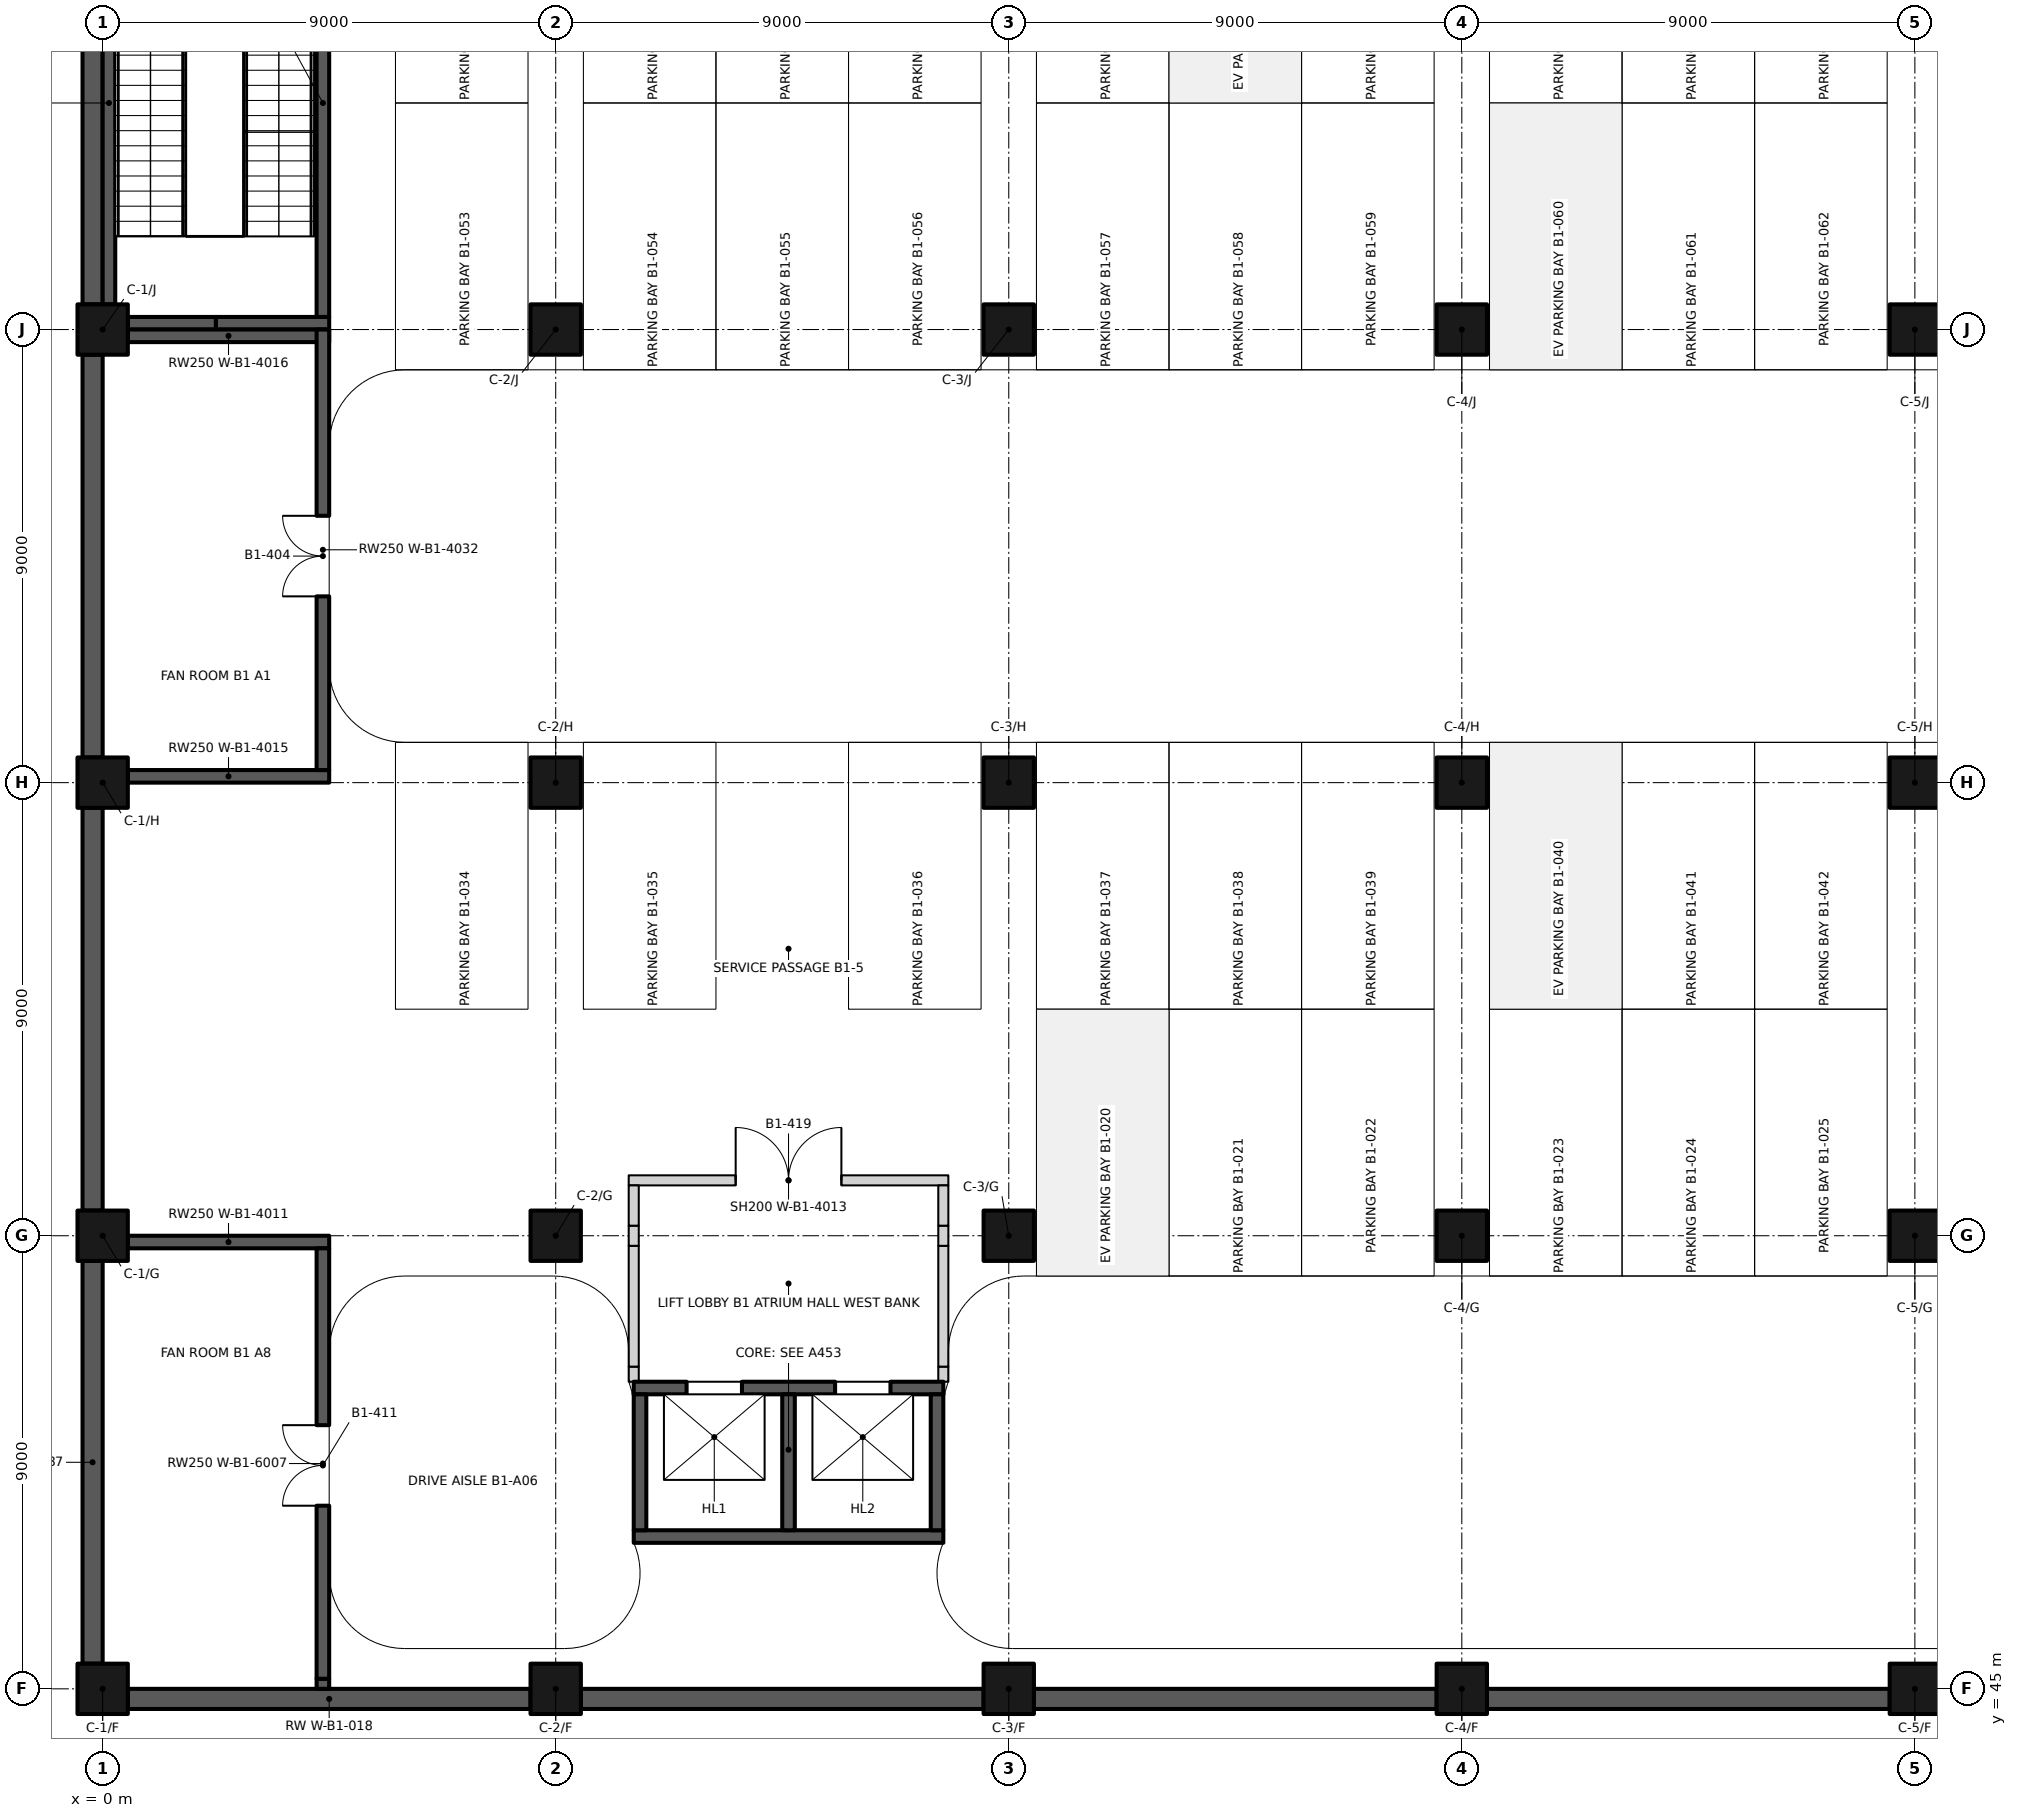
"""IFC4 building model, lengths in metres.
Left out: names, types, materials, properties, quantities, classifications, styles, units other than length and angle.
Written with IfcOpenShell. Run it as: python <this file> out.ifc"""

import sys

from ifc_helpers import new_model, si_unit, direction, frame, frame_2d, origin, origin_2d, place, context, subcontext, project, spatial, rectangle, extrude, element, fill, save


model = new_model("IFC4")
c1 = context("Model", 3, precision=1e-05, world=origin(), true_north=direction((0.0, 1.0)))
c2 = subcontext(c1, "Body", "Model", "MODEL_VIEW")
j1 = project(units=[si_unit("LENGTHUNIT", "METRE"), si_unit("PLANEANGLEUNIT", "RADIAN")], contexts=[c1])
p1 = place(None, origin())
s1 = spatial("IfcSite", under=j1, at=p1, CompositionType="ELEMENT")
p2 = place(p1, origin())
s2 = spatial("IfcBuilding", under=s1, at=p2, CompositionType="ELEMENT")
p3 = place(p2, frame((0.0, 0.0, -5.1)))
s3 = spatial("IfcBuildingStorey", under=s2, at=p3, CompositionType="ELEMENT", Elevation=-5.1)
for number, where, z_axis, x_axis in (
    (1, (0.5, 44.8, 0.0), (0.0, 0.0, 1.0), (1.0, 0.0, 0.0)),
    (2, (9.5, 44.8, 0.0), (0.0, 0.0, 1.0), (1.0, 0.0, 0.0)),
    (3, (18.5, 44.8, 0.0), (0.0, 0.0, 1.0), (1.0, 0.0, 0.0)),
    (4, (27.5, 44.8, 0.0), (0.0, 0.0, 1.0), (1.0, 0.0, 0.0)),
    (5, (-0.2, 45.5, 0.0), (0.0, 0.0, 1.0), (0.0, 1.0, 0.0)),
    (6, (-0.2, 54.5, 0.0), (0.0, 0.0, 1.0), (0.0, 1.0, 0.0)),
    (7, (-0.2, 63.5, 0.0), (0.0, 0.0, 1.0), (0.0, 1.0, 0.0)),
    (8, (-0.2, 72.5, 0.0), (0.0, 0.0, 1.0), (0.0, 1.0, 0.0)),
):
    element("IfcWall", number, at=place(p3, frame(where, z_axis=z_axis, x_axis=x_axis)), inside=s3, PredefinedType="SOLIDWALL", context=c2, shape_type="SweptSolid", body=[
        extrude(rectangle(XDim=8.0, YDim=0.4, at=frame_2d((4.0, 0.0))), origin(), (0.0, 0.0, 1.0), 5.1),
    ])
for number, where, z_axis, x_axis in (
    (9, (0.0, 45.0, 0.0), (0.0, 0.0, 1.0), (1.0, 0.0, 0.0)),
    (10, (9.0, 45.0, 0.0), (0.0, 0.0, 1.0), (1.0, 0.0, 0.0)),
    (11, (18.0, 45.0, 0.0), (0.0, 0.0, 1.0), (1.0, 0.0, 0.0)),
    (12, (27.0, 45.0, 0.0), (0.0, 0.0, 1.0), (1.0, 0.0, 0.0)),
    (13, (36.0, 45.0, 0.0), (0.0, 0.0, 1.0), (1.0, 0.0, 0.0)),
    (14, (0.0, 54.0, 0.0), (0.0, 0.0, 1.0), (1.0, 0.0, 0.0)),
    (15, (9.0, 54.0, 0.0), (0.0, 0.0, 1.0), (1.0, 0.0, 0.0)),
    (16, (18.0, 54.0, 0.0), (0.0, 0.0, 1.0), (1.0, 0.0, 0.0)),
    (17, (27.0, 54.0, 0.0), (0.0, 0.0, 1.0), (1.0, 0.0, 0.0)),
    (18, (36.0, 54.0, 0.0), (0.0, 0.0, 1.0), (1.0, 0.0, 0.0)),
    (19, (0.0, 63.0, 0.0), (0.0, 0.0, 1.0), (1.0, 0.0, 0.0)),
    (20, (9.0, 63.0, 0.0), (0.0, 0.0, 1.0), (1.0, 0.0, 0.0)),
    (21, (18.0, 63.0, 0.0), (0.0, 0.0, 1.0), (1.0, 0.0, 0.0)),
    (22, (27.0, 63.0, 0.0), (0.0, 0.0, 1.0), (1.0, 0.0, 0.0)),
    (23, (36.0, 63.0, 0.0), (0.0, 0.0, 1.0), (1.0, 0.0, 0.0)),
    (24, (0.0, 72.0, 0.0), (0.0, 0.0, 1.0), (1.0, 0.0, 0.0)),
    (25, (9.0, 72.0, 0.0), (0.0, 0.0, 1.0), (1.0, 0.0, 0.0)),
    (26, (18.0, 72.0, 0.0), (0.0, 0.0, 1.0), (1.0, 0.0, 0.0)),
    (27, (27.0, 72.0, 0.0), (0.0, 0.0, 1.0), (1.0, 0.0, 0.0)),
    (28, (36.0, 72.0, 0.0), (0.0, 0.0, 1.0), (1.0, 0.0, 0.0)),
):
    element("IfcColumn", number, at=place(p3, frame(where, z_axis=z_axis, x_axis=x_axis)), inside=s3, PredefinedType="COLUMN", context=c2, shape_type="SweptSolid", body=[
        extrude(rectangle(XDim=1.0, YDim=1.0, at=origin_2d()), origin(), (0.0, 0.0, 1.0), 5.1),
    ])
p4 = place(p3, frame((0.5, 72.125, 0.0), z_axis=(0.0, 0.0, 1.0), x_axis=(1.0, 0.0, 0.0)))
e29 = element("IfcWall", 29, at=p4, inside=s3, PredefinedType="SHEAR", context=c2, shape_type="SweptSolid", body=[
    extrude(rectangle(XDim=1.75, YDim=0.25, at=frame_2d((0.875, 0.0))), origin(), (0.0, 0.0, 1.0), 5.1),
])
p5 = place(p3, frame((2.25, 72.125, 0.0), z_axis=(0.0, 0.0, 1.0), x_axis=(1.0, 0.0, 0.0)))
e30 = element("IfcWall", 30, at=p5, inside=s3, PredefinedType="SHEAR", context=c2, shape_type="SweptSolid", body=[
    extrude(rectangle(XDim=2.25, YDim=0.25, at=frame_2d((1.125, 0.0))), origin(), (0.0, 0.0, 1.0), 5.1),
])
p6 = place(p3, frame((0.125, 72.5, 0.0), z_axis=(0.0, 0.0, 1.0), x_axis=(0.0, 1.0, 0.0)))
e31 = element("IfcWall", 31, at=p6, inside=s3, PredefinedType="SHEAR", context=c2, shape_type="SweptSolid", body=[
    extrude(rectangle(XDim=8.0, YDim=0.25, at=frame_2d((4.0, 0.0))), origin(), (0.0, 0.0, 1.0), 5.1),
])
p7 = place(p3, frame((4.375, 72.25, 0.0), z_axis=(0.0, 0.0, 1.0), x_axis=(0.0, 1.0, 0.0)))
e32 = element("IfcWall", 32, at=p7, inside=s3, PredefinedType="SHEAR", context=c2, shape_type="SweptSolid", body=[
    extrude(rectangle(XDim=8.5, YDim=0.25, at=frame_2d((4.25, 0.0))), origin(), (0.0, 0.0, 1.0), 5.1),
])
p8 = place(p7, frame((8.0, 0.0, 0.0), z_axis=(0.0, 0.0, 1.0), x_axis=(-1.0, 0.0, 0.0)))
e33 = element("IfcOpeningElement", 33, at=p8, cuts=e32, PredefinedType="OPENING", context=c2, shape_type="SweptSolid", body=[
    extrude(rectangle(XDim=1.1, YDim=2.1, at=frame_2d((0.55, 1.05))), frame((0.0, 0.135, 0.0), z_axis=(0.0, -1.0, 0.0), x_axis=(1.0, 0.0, 0.0)), (0.0, 0.0, 1.0), 0.27),
])
p9 = place(p3, frame((10.55, 50.975, 0.0), z_axis=(0.0, 0.0, 1.0), x_axis=(1.0, 0.0, 0.0)))
e34 = element("IfcWall", 34, at=p9, inside=s3, PredefinedType="SHEAR", context=c2, shape_type="SweptSolid", body=[
    extrude(rectangle(XDim=6.15, YDim=0.25, at=frame_2d((3.075, 0.0))), origin(), (0.0, 0.0, 1.0), 5.1),
])
p10 = place(p9, frame((1.05, 0.0, 0.0)))
e35 = element("IfcOpeningElement", 35, at=p10, cuts=e34, PredefinedType="OPENING", context=c2, shape_type="SweptSolid", body=[
    extrude(rectangle(XDim=1.1, YDim=2.1, at=frame_2d((0.55, 1.05))), frame((0.0, 0.135, 0.0), z_axis=(0.0, -1.0, 0.0), x_axis=(1.0, 0.0, 0.0)), (0.0, 0.0, 1.0), 0.27),
])
p11 = place(p9, frame((4.0, 0.0, 0.0)))
e36 = element("IfcOpeningElement", 36, at=p11, cuts=e34, PredefinedType="OPENING", context=c2, shape_type="SweptSolid", body=[
    extrude(rectangle(XDim=1.1, YDim=2.1, at=frame_2d((0.55, 1.05))), frame((0.0, 0.135, 0.0), z_axis=(0.0, -1.0, 0.0), x_axis=(1.0, 0.0, 0.0)), (0.0, 0.0, 1.0), 0.27),
])
p12 = place(p3, frame((10.55, 48.025, 0.0), z_axis=(0.0, 0.0, 1.0), x_axis=(1.0, 0.0, 0.0)))
e37 = element("IfcWall", 37, at=p12, inside=s3, PredefinedType="SHEAR", context=c2, shape_type="SweptSolid", body=[
    extrude(rectangle(XDim=6.15, YDim=0.25, at=frame_2d((3.075, 0.0))), origin(), (0.0, 0.0, 1.0), 5.1),
])
for number, where, z_axis, x_axis in (
    (38, (10.675, 48.15, 0.0), (0.0, 0.0, 1.0), (0.0, 1.0, 0.0)),
    (39, (13.625, 48.15, 0.0), (0.0, 0.0, 1.0), (0.0, 1.0, 0.0)),
    (40, (16.575, 48.15, 0.0), (0.0, 0.0, 1.0), (0.0, 1.0, 0.0)),
):
    element("IfcWall", number, at=place(p3, frame(where, z_axis=z_axis, x_axis=x_axis)), inside=s3, PredefinedType="SHEAR", context=c2, shape_type="SweptSolid", body=[
        extrude(rectangle(XDim=2.7, YDim=0.25, at=frame_2d((1.35, 0.0))), origin(), (0.0, 0.0, 1.0), 5.1),
    ])
p13 = place(p3, frame((0.5, 53.875, 0.0), z_axis=(0.0, 0.0, 1.0), x_axis=(1.0, 0.0, 0.0)))
e41 = element("IfcWall", 41, at=p13, inside=s3, PredefinedType="SOLIDWALL", context=c2, shape_type="SweptSolid", body=[
    extrude(rectangle(XDim=4.0, YDim=0.25, at=frame_2d((2.0, 0.0))), origin(), (0.0, 0.0, 1.0), 4.75),
])
p14 = place(p3, frame((10.45, 55.1, 0.0), z_axis=(0.0, 0.0, 1.0), x_axis=(1.0, 0.0, 0.0)))
e42 = element("IfcWall", 42, at=p14, inside=s3, PredefinedType="PARTITIONING", context=c2, shape_type="SweptSolid", body=[
    extrude(rectangle(XDim=6.35, YDim=0.2, at=frame_2d((3.175, 0.0))), origin(), (0.0, 0.0, 1.0), 4.75),
])
p15 = place(p14, frame((2.125, 0.0, 0.0)))
e43 = element("IfcOpeningElement", 43, at=p15, cuts=e42, PredefinedType="OPENING", context=c2, shape_type="SweptSolid", body=[
    extrude(rectangle(XDim=2.1, YDim=2.4, at=frame_2d((1.05, 1.2))), frame((0.0, 0.11, 0.0), z_axis=(0.0, -1.0, 0.0), x_axis=(1.0, 0.0, 0.0)), (0.0, 0.0, 1.0), 0.22),
])
for number, where, z_axis, x_axis in (
    (44, (0.5, 63.125, 0.0), (0.0, 0.0, 1.0), (1.0, 0.0, 0.0)),
    (45, (0.5, 71.875, 0.0), (0.0, 0.0, 1.0), (1.0, 0.0, 0.0)),
):
    element("IfcWall", number, at=place(p3, frame(where, z_axis=z_axis, x_axis=x_axis)), inside=s3, PredefinedType="SOLIDWALL", context=c2, shape_type="SweptSolid", body=[
        extrude(rectangle(XDim=4.0, YDim=0.25, at=frame_2d((2.0, 0.0))), origin(), (0.0, 0.0, 1.0), 4.75),
    ])
p16 = place(p3, frame((4.375, 45.0, 0.0), z_axis=(0.0, 0.0, 1.0), x_axis=(0.0, 1.0, 0.0)))
e46 = element("IfcWall", 46, at=p16, inside=s3, PredefinedType="SOLIDWALL", context=c2, shape_type="SweptSolid", body=[
    extrude(rectangle(XDim=0.2, YDim=0.25, at=frame_2d((0.1, 0.0))), origin(), (0.0, 0.0, 1.0), 4.3),
])
p17 = place(p3, frame((4.375, 45.2, 0.0), z_axis=(0.0, 0.0, 1.0), x_axis=(0.0, 1.0, 0.0)))
e47 = element("IfcWall", 47, at=p17, inside=s3, PredefinedType="SOLIDWALL", context=c2, shape_type="SweptSolid", body=[
    extrude(rectangle(XDim=8.55, YDim=0.25, at=frame_2d((4.275, 0.0))), origin(), (0.0, 0.0, 1.0), 4.75),
])
p18 = place(p17, frame((3.438, 0.0, 0.0)))
e48 = element("IfcOpeningElement", 48, at=p18, cuts=e47, PredefinedType="OPENING", context=c2, shape_type="SweptSolid", body=[
    extrude(rectangle(XDim=1.6, YDim=2.1, at=frame_2d((0.8, 1.05))), frame((0.0, 0.135, 0.0), z_axis=(0.0, -1.0, 0.0), x_axis=(1.0, 0.0, 0.0)), (0.0, 0.0, 1.0), 0.27),
])
p19 = place(p3, frame((4.375, 63.25, 0.0), z_axis=(0.0, 0.0, 1.0), x_axis=(0.0, 1.0, 0.0)))
e49 = element("IfcWall", 49, at=p19, inside=s3, PredefinedType="SOLIDWALL", context=c2, shape_type="SweptSolid", body=[
    extrude(rectangle(XDim=8.75, YDim=0.25, at=frame_2d((4.375, 0.0))), origin(), (0.0, 0.0, 1.0), 4.75),
])
p20 = place(p19, frame((3.45, 0.0, 0.0)))
e50 = element("IfcOpeningElement", 50, at=p20, cuts=e49, PredefinedType="OPENING", context=c2, shape_type="SweptSolid", body=[
    extrude(rectangle(XDim=1.6, YDim=2.1, at=frame_2d((0.8, 1.05))), frame((0.0, 0.135, 0.0), z_axis=(0.0, -1.0, 0.0), x_axis=(1.0, 0.0, 0.0)), (0.0, 0.0, 1.0), 0.27),
])
p21 = place(p3, frame((10.55, 51.1, 0.0), z_axis=(0.0, 0.0, 1.0), x_axis=(0.0, 1.0, 0.0)))
e51 = element("IfcWall", 51, at=p21, inside=s3, PredefinedType="PARTITIONING", context=c2, shape_type="SweptSolid", body=[
    extrude(rectangle(XDim=0.3, YDim=0.2, at=frame_2d((0.15, 0.0))), origin(), (0.0, 0.0, 1.0), 4.5),
])
p22 = place(p3, frame((10.55, 51.4, 0.0), z_axis=(0.0, 0.0, 1.0), x_axis=(0.0, 1.0, 0.0)))
e52 = element("IfcWall", 52, at=p22, inside=s3, PredefinedType="PARTITIONING", context=c2, shape_type="SweptSolid", body=[
    extrude(rectangle(XDim=2.4, YDim=0.2, at=frame_2d((1.2, 0.0))), origin(), (0.0, 0.0, 1.0), 4.75),
])
p23 = place(p3, frame((10.55, 53.8, 0.0), z_axis=(0.0, 0.0, 1.0), x_axis=(0.0, 1.0, 0.0)))
e53 = element("IfcWall", 53, at=p23, inside=s3, PredefinedType="PARTITIONING", context=c2, shape_type="SweptSolid", body=[
    extrude(rectangle(XDim=0.4, YDim=0.2, at=frame_2d((0.2, 0.0))), origin(), (0.0, 0.0, 1.0), 4.3),
])
p24 = place(p3, frame((10.55, 54.2, 0.0), z_axis=(0.0, 0.0, 1.0), x_axis=(0.0, 1.0, 0.0)))
e54 = element("IfcWall", 54, at=p24, inside=s3, PredefinedType="PARTITIONING", context=c2, shape_type="SweptSolid", body=[
    extrude(rectangle(XDim=0.8, YDim=0.2, at=frame_2d((0.4, 0.0))), origin(), (0.0, 0.0, 1.0), 4.75),
])
p25 = place(p3, frame((16.7, 51.1, 0.0), z_axis=(0.0, 0.0, 1.0), x_axis=(0.0, 1.0, 0.0)))
e55 = element("IfcWall", 55, at=p25, inside=s3, PredefinedType="PARTITIONING", context=c2, shape_type="SweptSolid", body=[
    extrude(rectangle(XDim=0.3, YDim=0.2, at=frame_2d((0.15, 0.0))), origin(), (0.0, 0.0, 1.0), 4.5),
])
p26 = place(p3, frame((16.7, 51.4, 0.0), z_axis=(0.0, 0.0, 1.0), x_axis=(0.0, 1.0, 0.0)))
e56 = element("IfcWall", 56, at=p26, inside=s3, PredefinedType="PARTITIONING", context=c2, shape_type="SweptSolid", body=[
    extrude(rectangle(XDim=2.4, YDim=0.2, at=frame_2d((1.2, 0.0))), origin(), (0.0, 0.0, 1.0), 4.75),
])
p27 = place(p3, frame((16.7, 53.8, 0.0), z_axis=(0.0, 0.0, 1.0), x_axis=(0.0, 1.0, 0.0)))
e57 = element("IfcWall", 57, at=p27, inside=s3, PredefinedType="PARTITIONING", context=c2, shape_type="SweptSolid", body=[
    extrude(rectangle(XDim=0.4, YDim=0.2, at=frame_2d((0.2, 0.0))), origin(), (0.0, 0.0, 1.0), 4.3),
])
p28 = place(p3, frame((16.7, 54.2, 0.0), z_axis=(0.0, 0.0, 1.0), x_axis=(0.0, 1.0, 0.0)))
e58 = element("IfcWall", 58, at=p28, inside=s3, PredefinedType="PARTITIONING", context=c2, shape_type="SweptSolid", body=[
    extrude(rectangle(XDim=0.8, YDim=0.2, at=frame_2d((0.4, 0.0))), origin(), (0.0, 0.0, 1.0), 4.75),
])
p29 = place(p10, origin())
e59 = element("IfcDoor", 59, at=p29, inside=s3, OperationType="DOUBLE_DOOR_SLIDING", PredefinedType="DOOR", context=c2, shape_type="SweptSolid", body=[
    extrude(rectangle(XDim=1.1, YDim=2.1, at=frame_2d((0.55, 1.05))), frame((0.0, 0.025, 0.0), z_axis=(0.0, -1.0, 0.0), x_axis=(1.0, 0.0, 0.0)), (0.0, 0.0, 1.0), 0.05),
])
fill(e35, e59)
p30 = place(p11, origin())
e60 = element("IfcDoor", 60, at=p30, inside=s3, OperationType="DOUBLE_DOOR_SLIDING", PredefinedType="DOOR", context=c2, shape_type="SweptSolid", body=[
    extrude(rectangle(XDim=1.1, YDim=2.1, at=frame_2d((0.55, 1.05))), frame((0.0, 0.025, 0.0), z_axis=(0.0, -1.0, 0.0), x_axis=(1.0, 0.0, 0.0)), (0.0, 0.0, 1.0), 0.05),
])
fill(e36, e60)
p31 = place(p20, origin())
e61 = element("IfcDoor", 61, at=p31, inside=s3, OperationType="DOUBLE_DOOR_SINGLE_SWING", PredefinedType="DOOR", context=c2, shape_type="SweptSolid", body=[
    extrude(rectangle(XDim=1.6, YDim=2.1, at=frame_2d((0.8, 1.05))), frame((0.0, 0.025, 0.0), z_axis=(0.0, -1.0, 0.0), x_axis=(1.0, 0.0, 0.0)), (0.0, 0.0, 1.0), 0.05),
])
fill(e50, e61)
p32 = place(p18, origin())
e62 = element("IfcDoor", 62, at=p32, inside=s3, OperationType="DOUBLE_DOOR_SINGLE_SWING", PredefinedType="DOOR", context=c2, shape_type="SweptSolid", body=[
    extrude(rectangle(XDim=1.6, YDim=2.1, at=frame_2d((0.8, 1.05))), frame((0.0, 0.025, 0.0), z_axis=(0.0, -1.0, 0.0), x_axis=(1.0, 0.0, 0.0)), (0.0, 0.0, 1.0), 0.05),
])
fill(e48, e62)
p33 = place(p15, origin())
e63 = element("IfcDoor", 63, at=p33, inside=s3, OperationType="DOUBLE_DOOR_SINGLE_SWING", PredefinedType="DOOR", context=c2, shape_type="SweptSolid", body=[
    extrude(rectangle(XDim=2.1, YDim=2.4, at=frame_2d((1.05, 1.2))), frame((0.0, 0.025, 0.0), z_axis=(0.0, -1.0, 0.0), x_axis=(1.0, 0.0, 0.0)), (0.0, 0.0, 1.0), 0.05),
])
fill(e43, e63)
save(model, sys.argv[1])
